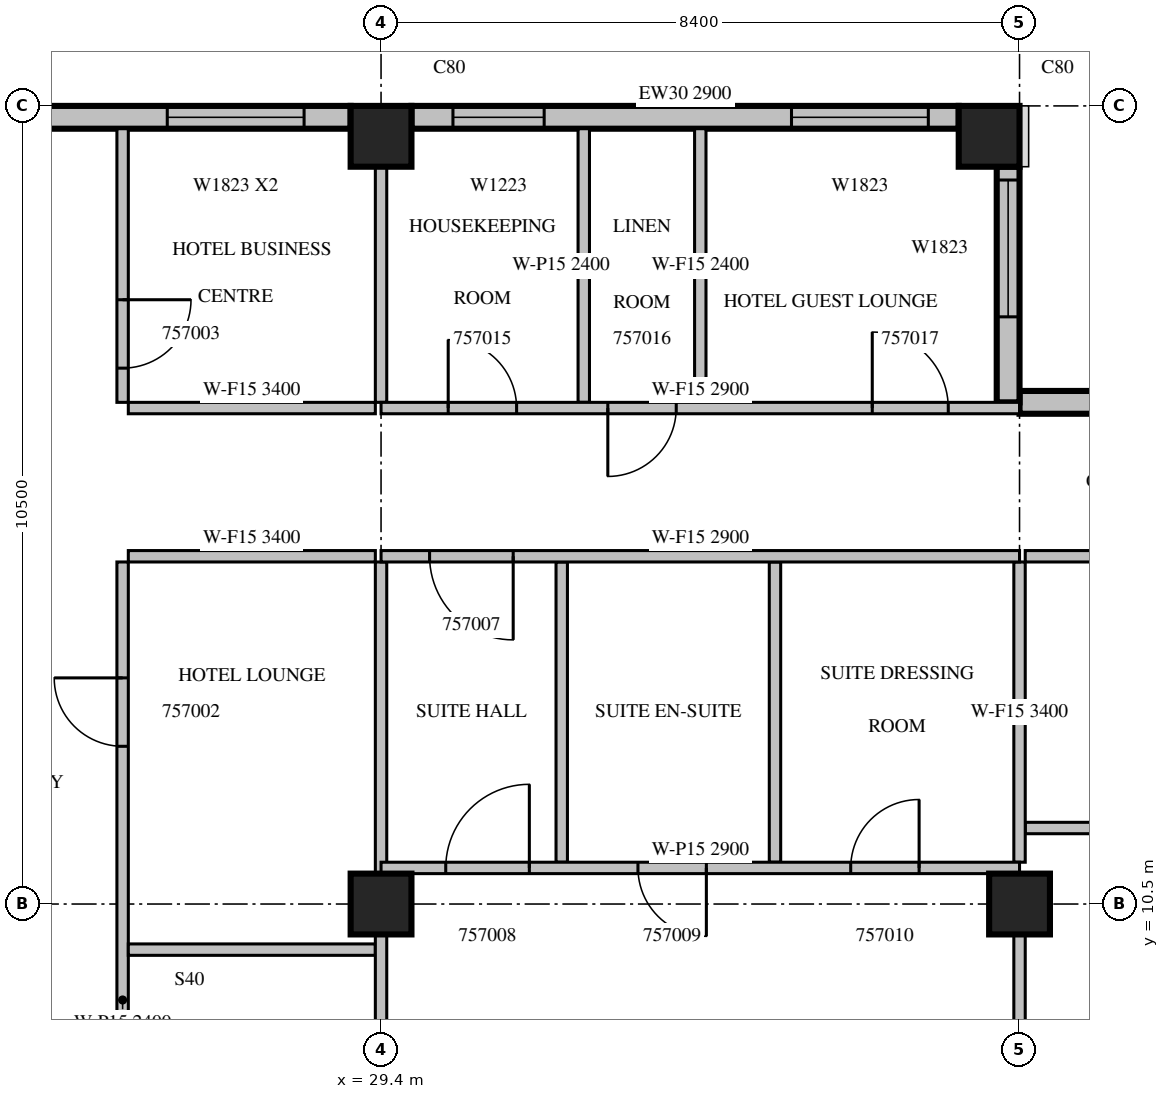
"""IFC4 building model, lengths in metres.
Left out: names, types, materials, properties, quantities, classifications, styles, units other than length and angle.
Written with IfcOpenShell. Run it as: python <this file> out.ifc"""

import sys

from ifc_helpers import new_model, si_unit, direction, frame, frame_2d, origin, origin_2d, place, context, subcontext, project, spatial, rectangle, extrude, source, transform, mapped, element, fill, save


model = new_model("IFC4")
c1 = context("Model", 3, precision=1e-05, world=origin(), true_north=direction((0.0, 1.0)))
c2 = subcontext(c1, "Body", "Model", "MODEL_VIEW")
j1 = project(units=[si_unit("LENGTHUNIT", "METRE"), si_unit("PLANEANGLEUNIT", "RADIAN")], contexts=[c1])
p1 = place(None, origin())
s1 = spatial("IfcSite", under=j1, at=p1, CompositionType="ELEMENT")
p2 = place(p1, origin())
s2 = spatial("IfcBuilding", under=s1, at=p2, CompositionType="ELEMENT")
p3 = place(p2, frame((0.0, 0.0, 250.0)))
s3 = spatial("IfcBuildingStorey", under=s2, at=p3, CompositionType="ELEMENT", Elevation=250.0)
m1 = source(origin(), c2, "Body", "SweptSolid", [
    extrude(rectangle(XDim=0.8, YDim=0.8, at=origin_2d()), origin(), (0.0, 0.0, 1.0), 3.8),
])
for number, where, z_axis, x_axis in (
    (1, (29.4, 10.5, 0.0), (0.0, 0.0, 1.0), (1.0, 0.0, 0.0)),
    (2, (37.8, 10.5, 0.0), (0.0, 0.0, 1.0), (1.0, 0.0, 0.0)),
    (3, (29.4, 20.6, 0.0), (0.0, 0.0, 1.0), (1.0, 0.0, 0.0)),
    (4, (37.4, 20.6, 0.0), (0.0, 0.0, 1.0), (1.0, 0.0, 0.0)),
):
    element("IfcColumn", number, at=place(p3, frame(where, z_axis=z_axis, x_axis=x_axis)), inside=s3, PredefinedType="COLUMN", context=c2, shape_type="MappedRepresentation", body=[
        mapped(m1, transform((0.0, 0.0, 0.0), scale=1.0)),
    ])
m2 = source(origin(), c2, "Body", "SweptSolid", [
    extrude(rectangle(XDim=15.96, YDim=0.3, at=frame_2d((7.98, 0.0))), origin(), (0.0, 0.0, 1.0), 3.4),
])
p4 = place(p3, frame((53.76, 17.1, 0.0), z_axis=(0.0, 0.0, 1.0), x_axis=(-1.0, 0.0, 0.0)))
e5 = element("IfcWall", 5, at=p4, inside=s3, PredefinedType="STANDARD", context=c2, shape_type="MappedRepresentation", body=[
    mapped(m2, transform((0.0, 0.0, 0.0), scale=1.0)),
])
m3 = source(origin(), c2, "Body", "SweptSolid", [
    extrude(rectangle(XDim=3.0, YDim=2.3, at=frame_2d((1.5, 1.15))), frame((0.0, 0.16, 0.0), z_axis=(0.0, -1.0, 0.0), x_axis=(1.0, 0.0, 0.0)), (0.0, 0.0, 1.0), 0.32),
])
p5 = place(p4, frame((0.6, 0.0, 0.6)))
e6 = element("IfcOpeningElement", 6, at=p5, cuts=e5, PredefinedType="OPENING", context=c2, shape_type="MappedRepresentation", body=[
    mapped(m3, transform((0.0, 0.0, 0.0), scale=1.0)),
])
p6 = place(p4, frame((4.8, 0.0, 0.6)))
e7 = element("IfcOpeningElement", 7, at=p6, cuts=e5, PredefinedType="OPENING", context=c2, shape_type="MappedRepresentation", body=[
    mapped(m3, transform((0.0, 0.0, 0.0), scale=1.0)),
])
m4 = source(origin(), c2, "Body", "SweptSolid", [
    extrude(rectangle(XDim=3.6, YDim=2.3, at=frame_2d((1.8, 1.15))), frame((0.0, 0.16, 0.0), z_axis=(0.0, -1.0, 0.0), x_axis=(1.0, 0.0, 0.0)), (0.0, 0.0, 1.0), 0.32),
])
p7 = place(p4, frame((9.54, 0.0, 0.6)))
e8 = element("IfcOpeningElement", 8, at=p7, cuts=e5, PredefinedType="OPENING", context=c2, shape_type="MappedRepresentation", body=[
    mapped(m4, transform((0.0, 0.0, 0.0), scale=1.0)),
])
m5 = source(origin(), c2, "Body", "SweptSolid", [
    extrude(rectangle(XDim=3.1, YDim=0.3, at=frame_2d((1.55, 0.0))), origin(), (0.0, 0.0, 1.0), 3.4),
])
p8 = place(p3, frame((37.65, 17.1, 0.0), z_axis=(0.0, 0.0, 1.0), x_axis=(0.0, 1.0, 0.0)))
e9 = element("IfcWall", 9, at=p8, inside=s3, PredefinedType="STANDARD", context=c2, shape_type="MappedRepresentation", body=[
    mapped(m5, transform((0.0, 0.0, 0.0), scale=1.0)),
])
m6 = source(origin(), c2, "Body", "SweptSolid", [
    extrude(rectangle(XDim=1.8, YDim=2.3, at=frame_2d((0.9, 1.15))), frame((0.0, 0.16, 0.0), z_axis=(0.0, -1.0, 0.0), x_axis=(1.0, 0.0, 0.0)), (0.0, 0.0, 1.0), 0.32),
])
p9 = place(p8, frame((1.125, 0.0, 0.6)))
e10 = element("IfcOpeningElement", 10, at=p9, cuts=e9, PredefinedType="OPENING", context=c2, shape_type="MappedRepresentation", body=[
    mapped(m6, transform((0.0, 0.0, 0.0), scale=1.0)),
])
m7 = source(origin(), c2, "Body", "SweptSolid", [
    extrude(rectangle(XDim=7.2, YDim=0.3, at=frame_2d((3.6, 0.0))), origin(), (0.0, 0.0, 1.0), 2.9),
])
p10 = place(p3, frame((37.0, 20.85, 0.0), z_axis=(0.0, 0.0, 1.0), x_axis=(-1.0, 0.0, 0.0)))
e11 = element("IfcWall", 11, at=p10, inside=s3, PredefinedType="STANDARD", context=c2, shape_type="MappedRepresentation", body=[
    mapped(m7, transform((0.0, 0.0, 0.0), scale=1.0)),
])
p11 = place(p10, frame((0.4, 0.0, 0.6)))
e12 = element("IfcOpeningElement", 12, at=p11, cuts=e11, PredefinedType="OPENING", context=c2, shape_type="MappedRepresentation", body=[
    mapped(m6, transform((0.0, 0.0, 0.0), scale=1.0)),
])
m8 = source(origin(), c2, "Body", "SweptSolid", [
    extrude(rectangle(XDim=1.2, YDim=2.3, at=frame_2d((0.6, 1.15))), frame((0.0, 0.16, 0.0), z_axis=(0.0, -1.0, 0.0), x_axis=(1.0, 0.0, 0.0)), (0.0, 0.0, 1.0), 0.32),
])
p12 = place(p10, frame((5.454, 0.0, 0.6)))
e13 = element("IfcOpeningElement", 13, at=p12, cuts=e11, PredefinedType="OPENING", context=c2, shape_type="MappedRepresentation", body=[
    mapped(m8, transform((0.0, 0.0, 0.0), scale=1.0)),
])
m9 = source(origin(), c2, "Body", "SweptSolid", [
    extrude(rectangle(XDim=7.2, YDim=0.3, at=frame_2d((3.6, 0.0))), origin(), (0.0, 0.0, 1.0), 3.4),
])
p13 = place(p3, frame((29.0, 20.85, 0.0), z_axis=(0.0, 0.0, 1.0), x_axis=(-1.0, 0.0, 0.0)))
e14 = element("IfcWall", 14, at=p13, inside=s3, PredefinedType="STANDARD", context=c2, shape_type="MappedRepresentation", body=[
    mapped(m9, transform((0.0, 0.0, 0.0), scale=1.0)),
])
p14 = place(p13, frame((0.613, 0.0, 0.6)))
e15 = element("IfcOpeningElement", 15, at=p14, cuts=e14, PredefinedType="OPENING", context=c2, shape_type="MappedRepresentation", body=[
    mapped(m6, transform((0.0, 0.0, 0.0), scale=1.0)),
])
p15 = place(p13, frame((5.0, 0.0, 0.6)))
e16 = element("IfcOpeningElement", 16, at=p15, cuts=e14, PredefinedType="OPENING", context=c2, shape_type="MappedRepresentation", body=[
    mapped(m6, transform((0.0, 0.0, 0.0), scale=1.0)),
])
m10 = source(origin(), c2, "Body", "SweptSolid", [
    extrude(rectangle(XDim=11.525, YDim=0.15, at=frame_2d((5.763, 0.0))), origin(), (0.0, 0.0, 1.0), 2.4),
])
p16 = place(p3, frame((26.0, 15.0, 0.0), z_axis=(0.0, 0.0, 1.0), x_axis=(0.0, -1.0, 0.0)))
e17 = element("IfcWall", 17, at=p16, inside=s3, PredefinedType="PARTITIONING", context=c2, shape_type="MappedRepresentation", body=[
    mapped(m10, transform((0.0, 0.0, 0.0), scale=1.0)),
])
m11 = source(origin(), c2, "Body", "SweptSolid", [
    extrude(rectangle(XDim=0.9, YDim=2.1, at=frame_2d((0.45, 1.05))), frame((0.0, 0.085, 0.0), z_axis=(0.0, -1.0, 0.0), x_axis=(1.0, 0.0, 0.0)), (0.0, 0.0, 1.0), 0.17),
])
p17 = place(p16, frame((8.162, 0.0, 0.0)))
e18 = element("IfcOpeningElement", 18, at=p17, cuts=e17, PredefinedType="OPENING", context=c2, shape_type="MappedRepresentation", body=[
    mapped(m11, transform((0.0, 0.0, 0.0), scale=1.0)),
])
p18 = place(p16, frame((1.525, 0.0, 0.0)))
e19 = element("IfcOpeningElement", 19, at=p18, cuts=e17, PredefinedType="OPENING", context=c2, shape_type="MappedRepresentation", body=[
    mapped(m11, transform((0.0, 0.0, 0.0), scale=1.0)),
])
m12 = source(origin(), c2, "Body", "SweptSolid", [
    extrude(rectangle(XDim=3.6, YDim=0.15, at=frame_2d((1.8, 0.0))), origin(), (0.0, 0.0, 1.0), 3.4),
])
p19 = place(p3, frame((26.0, 20.7, 0.0), z_axis=(0.0, 0.0, 1.0), x_axis=(0.0, -1.0, 0.0)))
e20 = element("IfcWall", 20, at=p19, inside=s3, PredefinedType="PARTITIONING", context=c2, shape_type="MappedRepresentation", body=[
    mapped(m12, transform((0.0, 0.0, 0.0), scale=1.0)),
])
p20 = place(p19, frame((2.25, 0.0, 0.0)))
e21 = element("IfcOpeningElement", 21, at=p20, cuts=e20, PredefinedType="OPENING", context=c2, shape_type="MappedRepresentation", body=[
    mapped(m11, transform((0.0, 0.0, 0.0), scale=1.0)),
])
m13 = source(origin(), c2, "Body", "SweptSolid", [
    extrude(rectangle(XDim=3.25, YDim=0.15, at=frame_2d((1.625, 0.0))), origin(), (0.0, 0.0, 1.0), 3.4),
])
for number, where, z_axis, x_axis in (
    (22, (29.325, 9.9, 0.0), (0.0, 0.0, 1.0), (-1.0, 0.0, 0.0)),
    (23, (29.325, 15.075, 0.0), (0.0, 0.0, 1.0), (-1.0, 0.0, 0.0)),
    (24, (26.075, 17.025, 0.0), (0.0, 0.0, 1.0), (1.0, 0.0, 0.0)),
):
    element("IfcWall", number, at=place(p3, frame(where, z_axis=z_axis, x_axis=x_axis)), inside=s3, PredefinedType="PARTITIONING", context=c2, shape_type="MappedRepresentation", body=[
        mapped(m13, transform((0.0, 0.0, 0.0), scale=1.0)),
    ])
m14 = source(origin(), c2, "Body", "SweptSolid", [
    extrude(rectangle(XDim=6.626, YDim=0.15, at=frame_2d((3.313, 0.0))), origin(), (0.0, 0.0, 1.0), 3.4),
])
p21 = place(p3, frame((29.4, 3.475, 0.0), z_axis=(0.0, 0.0, 1.0), x_axis=(0.0, 1.0, 0.0)))
e25 = element("IfcWall", 25, at=p21, inside=s3, PredefinedType="PARTITIONING", context=c2, shape_type="MappedRepresentation", body=[
    mapped(m14, transform((0.0, 0.0, 0.0), scale=1.0)),
])
m15 = source(origin(), c2, "Body", "SweptSolid", [
    extrude(rectangle(XDim=4.101, YDim=0.15, at=frame_2d((2.05, 0.0))), origin(), (0.0, 0.0, 1.0), 3.4),
])
p22 = place(p3, frame((29.4, 10.899, 0.0), z_axis=(0.0, 0.0, 1.0), x_axis=(0.0, 1.0, 0.0)))
e26 = element("IfcWall", 26, at=p22, inside=s3, PredefinedType="PARTITIONING", context=c2, shape_type="MappedRepresentation", body=[
    mapped(m15, transform((0.0, 0.0, 0.0), scale=1.0)),
])
m16 = source(origin(), c2, "Body", "SweptSolid", [
    extrude(rectangle(XDim=3.101, YDim=0.15, at=frame_2d((1.55, 0.0))), origin(), (0.0, 0.0, 1.0), 3.4),
])
p23 = place(p3, frame((29.4, 17.1, 0.0), z_axis=(0.0, 0.0, 1.0), x_axis=(0.0, 1.0, 0.0)))
e27 = element("IfcWall", 27, at=p23, inside=s3, PredefinedType="PARTITIONING", context=c2, shape_type="MappedRepresentation", body=[
    mapped(m16, transform((0.0, 0.0, 0.0), scale=1.0)),
])
m17 = source(origin(), c2, "Body", "SweptSolid", [
    extrude(rectangle(XDim=6.45, YDim=0.15, at=frame_2d((3.225, 0.0))), origin(), (0.0, 0.0, 1.0), 3.4),
])
p24 = place(p3, frame((37.875, 11.5, 0.0), z_axis=(0.0, 0.0, 1.0), x_axis=(1.0, 0.0, 0.0)))
e28 = element("IfcWall", 28, at=p24, inside=s3, PredefinedType="PARTITIONING", context=c2, shape_type="MappedRepresentation", body=[
    mapped(m17, transform((0.0, 0.0, 0.0), scale=1.0)),
])
p25 = place(p3, frame((44.325, 15.075, 0.0), z_axis=(0.0, 0.0, 1.0), x_axis=(-1.0, 0.0, 0.0)))
e29 = element("IfcWall", 29, at=p25, inside=s3, PredefinedType="PARTITIONING", context=c2, shape_type="MappedRepresentation", body=[
    mapped(m17, transform((0.0, 0.0, 0.0), scale=1.0)),
])
p26 = place(p25, frame((2.812, 0.0, 0.0)))
e30 = element("IfcOpeningElement", 30, at=p26, cuts=e29, PredefinedType="OPENING", context=c2, shape_type="MappedRepresentation", body=[
    mapped(m11, transform((0.0, 0.0, 0.0), scale=1.0)),
])
m18 = source(origin(), c2, "Body", "SweptSolid", [
    extrude(rectangle(XDim=3.95, YDim=0.15, at=frame_2d((1.975, 0.0))), origin(), (0.0, 0.0, 1.0), 3.4),
])
for number, where, z_axis, x_axis in (
    (31, (31.777, 11.05, 0.0), (0.0, 0.0, 1.0), (0.0, 1.0, 0.0)),
    (32, (34.583, 11.05, 0.0), (0.0, 0.0, 1.0), (0.0, 1.0, 0.0)),
):
    element("IfcWall", number, at=place(p3, frame(where, z_axis=z_axis, x_axis=x_axis)), inside=s3, PredefinedType="PARTITIONING", context=c2, shape_type="MappedRepresentation", body=[
        mapped(m18, transform((0.0, 0.0, 0.0), scale=1.0)),
    ])
m19 = source(origin(), c2, "Body", "SweptSolid", [
    extrude(rectangle(XDim=9.302, YDim=0.15, at=frame_2d((4.651, 0.0))), origin(), (0.0, 0.0, 1.0), 3.4),
])
p27 = place(p3, frame((37.8, 0.799, 0.0), z_axis=(0.0, 0.0, 1.0), x_axis=(0.0, 1.0, 0.0)))
e33 = element("IfcWall", 33, at=p27, inside=s3, PredefinedType="PARTITIONING", context=c2, shape_type="MappedRepresentation", body=[
    mapped(m19, transform((0.0, 0.0, 0.0), scale=1.0)),
])
p28 = place(p3, frame((37.8, 11.05, 0.0), z_axis=(0.0, 0.0, 1.0), x_axis=(0.0, 1.0, 0.0)))
e34 = element("IfcWall", 34, at=p28, inside=s3, PredefinedType="PARTITIONING", context=c2, shape_type="MappedRepresentation", body=[
    mapped(m18, transform((0.0, 0.0, 0.0), scale=1.0)),
])
m20 = source(origin(), c2, "Body", "SweptSolid", [
    extrude(rectangle(XDim=8.4, YDim=0.15, at=frame_2d((4.2, 0.0))), origin(), (0.0, 0.0, 1.0), 2.9),
])
p29 = place(p3, frame((37.8, 10.975, 0.0), z_axis=(0.0, 0.0, 1.0), x_axis=(-1.0, 0.0, 0.0)))
e35 = element("IfcWall", 35, at=p29, inside=s3, PredefinedType="PARTITIONING", context=c2, shape_type="MappedRepresentation", body=[
    mapped(m20, transform((0.0, 0.0, 0.0), scale=1.0)),
])
m21 = source(origin(), c2, "Body", "SweptSolid", [
    extrude(rectangle(XDim=1.1, YDim=2.1, at=frame_2d((0.55, 1.05))), frame((0.0, 0.085, 0.0), z_axis=(0.0, -1.0, 0.0), x_axis=(1.0, 0.0, 0.0)), (0.0, 0.0, 1.0), 0.17),
])
p30 = place(p29, frame((6.449, 0.0, 0.0)))
e36 = element("IfcOpeningElement", 36, at=p30, cuts=e35, PredefinedType="OPENING", context=c2, shape_type="MappedRepresentation", body=[
    mapped(m21, transform((0.0, 0.0, 0.0), scale=1.0)),
])
p31 = place(p29, frame((4.12, 0.0, 0.0)))
e37 = element("IfcOpeningElement", 37, at=p31, cuts=e35, PredefinedType="OPENING", context=c2, shape_type="MappedRepresentation", body=[
    mapped(m11, transform((0.0, 0.0, 0.0), scale=1.0)),
])
p32 = place(p29, frame((1.321, 0.0, 0.0)))
e38 = element("IfcOpeningElement", 38, at=p32, cuts=e35, PredefinedType="OPENING", context=c2, shape_type="MappedRepresentation", body=[
    mapped(m11, transform((0.0, 0.0, 0.0), scale=1.0)),
])
m22 = source(origin(), c2, "Body", "SweptSolid", [
    extrude(rectangle(XDim=3.6, YDim=0.15, at=frame_2d((1.8, 0.0))), origin(), (0.0, 0.0, 1.0), 2.4),
])
for number, where, z_axis, x_axis in (
    (39, (32.067, 20.7, 0.0), (0.0, 0.0, 1.0), (0.0, -1.0, 0.0)),
    (40, (33.6, 17.1, 0.0), (0.0, 0.0, 1.0), (0.0, 1.0, 0.0)),
):
    element("IfcWall", number, at=place(p3, frame(where, z_axis=z_axis, x_axis=x_axis)), inside=s3, PredefinedType="PARTITIONING", context=c2, shape_type="MappedRepresentation", body=[
        mapped(m22, transform((0.0, 0.0, 0.0), scale=1.0)),
    ])
p33 = place(p3, frame((37.8, 15.075, 0.0), z_axis=(0.0, 0.0, 1.0), x_axis=(-1.0, 0.0, 0.0)))
e41 = element("IfcWall", 41, at=p33, inside=s3, PredefinedType="PARTITIONING", context=c2, shape_type="MappedRepresentation", body=[
    mapped(m20, transform((0.0, 0.0, 0.0), scale=1.0)),
])
p34 = place(p33, frame((6.662, 0.0, 0.0)))
e42 = element("IfcOpeningElement", 42, at=p34, cuts=e41, PredefinedType="OPENING", context=c2, shape_type="MappedRepresentation", body=[
    mapped(m21, transform((0.0, 0.0, 0.0), scale=1.0)),
])
p35 = place(p3, frame((29.4, 17.025, 0.0), z_axis=(0.0, 0.0, 1.0), x_axis=(1.0, 0.0, 0.0)))
e43 = element("IfcWall", 43, at=p35, inside=s3, PredefinedType="PARTITIONING", context=c2, shape_type="MappedRepresentation", body=[
    mapped(m20, transform((0.0, 0.0, 0.0), scale=1.0)),
])
p36 = place(p35, frame((0.883, 0.0, 0.0)))
e44 = element("IfcOpeningElement", 44, at=p36, cuts=e43, PredefinedType="OPENING", context=c2, shape_type="MappedRepresentation", body=[
    mapped(m11, transform((0.0, 0.0, 0.0), scale=1.0)),
])
p37 = place(p35, frame((2.983, 0.0, 0.0)))
e45 = element("IfcOpeningElement", 45, at=p37, cuts=e43, PredefinedType="OPENING", context=c2, shape_type="MappedRepresentation", body=[
    mapped(m11, transform((0.0, 0.0, 0.0), scale=1.0)),
])
m23 = source(origin(), c2, "Body", "SweptSolid", [
    extrude(rectangle(XDim=1.0, YDim=2.1, at=frame_2d((0.5, 1.05))), frame((0.0, 0.085, 0.0), z_axis=(0.0, -1.0, 0.0), x_axis=(1.0, 0.0, 0.0)), (0.0, 0.0, 1.0), 0.17),
])
p38 = place(p35, frame((6.463, 0.0, 0.0)))
e46 = element("IfcOpeningElement", 46, at=p38, cuts=e43, PredefinedType="OPENING", context=c2, shape_type="MappedRepresentation", body=[
    mapped(m23, transform((0.0, 0.0, 0.0), scale=1.0)),
])
m24 = source(origin(), c2, "Body", "SweptSolid", [
    extrude(rectangle(XDim=1.8, YDim=2.3, at=frame_2d((0.9, 1.15))), frame((0.0, 0.03, 0.0), z_axis=(0.0, -1.0, 0.0), x_axis=(1.0, 0.0, 0.0)), (0.0, 0.0, 1.0), 0.06),
])
p39 = place(p9, origin())
e47 = element("IfcWindow", 47, at=p39, inside=s3, PartitioningType="SINGLE_PANEL", PredefinedType="WINDOW", context=c2, shape_type="MappedRepresentation", body=[
    mapped(m24, transform((0.0, 0.0, 0.0), scale=1.0)),
])
fill(e10, e47)
p40 = place(p11, origin())
e48 = element("IfcWindow", 48, at=p40, inside=s3, PartitioningType="SINGLE_PANEL", PredefinedType="WINDOW", context=c2, shape_type="MappedRepresentation", body=[
    mapped(m24, transform((0.0, 0.0, 0.0), scale=1.0)),
])
fill(e12, e48)
m25 = source(origin(), c2, "Body", "SweptSolid", [
    extrude(rectangle(XDim=1.2, YDim=2.3, at=frame_2d((0.6, 1.15))), frame((0.0, 0.03, 0.0), z_axis=(0.0, -1.0, 0.0), x_axis=(1.0, 0.0, 0.0)), (0.0, 0.0, 1.0), 0.06),
])
p41 = place(p12, origin())
e49 = element("IfcWindow", 49, at=p41, inside=s3, PartitioningType="SINGLE_PANEL", PredefinedType="WINDOW", context=c2, shape_type="MappedRepresentation", body=[
    mapped(m25, transform((0.0, 0.0, 0.0), scale=1.0)),
])
fill(e13, e49)
p42 = place(p14, origin())
e50 = element("IfcWindow", 50, at=p42, inside=s3, PartitioningType="SINGLE_PANEL", PredefinedType="WINDOW", context=c2, shape_type="MappedRepresentation", body=[
    mapped(m24, transform((0.0, 0.0, 0.0), scale=1.0)),
])
fill(e15, e50)
m26 = source(origin(), c2, "Body", "SweptSolid", [
    extrude(rectangle(XDim=0.9, YDim=2.1, at=frame_2d((0.45, 1.05))), frame((0.0, 0.025, 0.0), z_axis=(0.0, -1.0, 0.0), x_axis=(1.0, 0.0, 0.0)), (0.0, 0.0, 1.0), 0.05),
])
p43 = place(p18, origin())
e51 = element("IfcDoor", 51, at=p43, inside=s3, OperationType="SINGLE_SWING_RIGHT", PredefinedType="DOOR", context=c2, shape_type="MappedRepresentation", body=[
    mapped(m26, transform((0.0, 0.0, 0.0), scale=1.0)),
])
fill(e19, e51)
p44 = place(p20, origin())
e52 = element("IfcDoor", 52, at=p44, inside=s3, OperationType="SINGLE_SWING_LEFT", PredefinedType="DOOR", context=c2, shape_type="MappedRepresentation", body=[
    mapped(m26, transform((0.0, 0.0, 0.0), scale=1.0)),
])
fill(e21, e52)
m27 = source(origin(), c2, "Body", "SweptSolid", [
    extrude(rectangle(XDim=1.1, YDim=2.1, at=frame_2d((0.55, 1.05))), frame((0.0, 0.025, 0.0), z_axis=(0.0, -1.0, 0.0), x_axis=(1.0, 0.0, 0.0)), (0.0, 0.0, 1.0), 0.05),
])
p45 = place(p34, origin())
e53 = element("IfcDoor", 53, at=p45, inside=s3, OperationType="SINGLE_SWING_LEFT", PredefinedType="DOOR", context=c2, shape_type="MappedRepresentation", body=[
    mapped(m27, transform((0.0, 0.0, 0.0), scale=1.0)),
])
fill(e42, e53)
p46 = place(p30, origin())
e54 = element("IfcDoor", 54, at=p46, inside=s3, OperationType="SINGLE_SWING_RIGHT", PredefinedType="DOOR", context=c2, shape_type="MappedRepresentation", body=[
    mapped(m27, transform((0.0, 0.0, 0.0), scale=1.0)),
])
fill(e36, e54)
p47 = place(p31, origin())
e55 = element("IfcDoor", 55, at=p47, inside=s3, OperationType="SINGLE_SWING_LEFT", PredefinedType="DOOR", context=c2, shape_type="MappedRepresentation", body=[
    mapped(m26, transform((0.0, 0.0, 0.0), scale=1.0)),
])
fill(e37, e55)
p48 = place(p32, origin())
e56 = element("IfcDoor", 56, at=p48, inside=s3, OperationType="SINGLE_SWING_RIGHT", PredefinedType="DOOR", context=c2, shape_type="MappedRepresentation", body=[
    mapped(m26, transform((0.0, 0.0, 0.0), scale=1.0)),
])
fill(e38, e56)
p49 = place(p36, origin())
e57 = element("IfcDoor", 57, at=p49, inside=s3, OperationType="SINGLE_SWING_LEFT", PredefinedType="DOOR", context=c2, shape_type="MappedRepresentation", body=[
    mapped(m26, transform((0.0, 0.0, 0.0), scale=1.0)),
])
fill(e44, e57)
p50 = place(p37, origin())
e58 = element("IfcDoor", 58, at=p50, inside=s3, OperationType="SINGLE_SWING_RIGHT", PredefinedType="DOOR", context=c2, shape_type="MappedRepresentation", body=[
    mapped(m26, transform((0.0, 0.0, 0.0), scale=1.0)),
])
fill(e45, e58)
m28 = source(origin(), c2, "Body", "SweptSolid", [
    extrude(rectangle(XDim=1.0, YDim=2.1, at=frame_2d((0.5, 1.05))), frame((0.0, 0.025, 0.0), z_axis=(0.0, -1.0, 0.0), x_axis=(1.0, 0.0, 0.0)), (0.0, 0.0, 1.0), 0.05),
])
p51 = place(p38, origin())
e59 = element("IfcDoor", 59, at=p51, inside=s3, OperationType="SINGLE_SWING_LEFT", PredefinedType="DOOR", context=c2, shape_type="MappedRepresentation", body=[
    mapped(m28, transform((0.0, 0.0, 0.0), scale=1.0)),
])
fill(e46, e59)
save(model, sys.argv[1])
